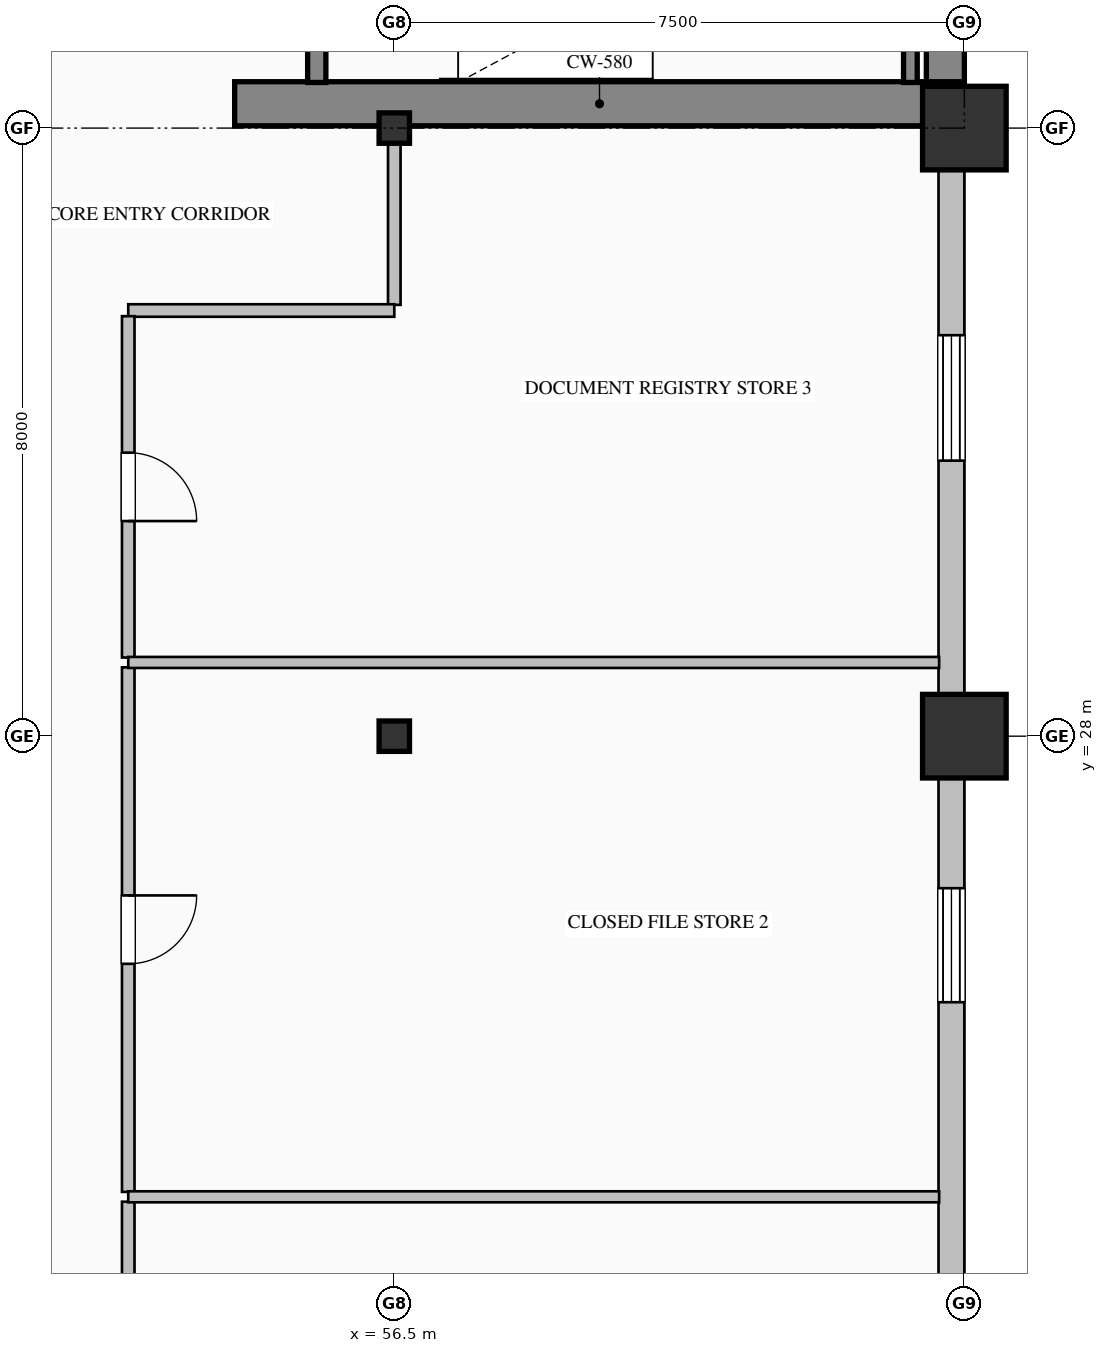
"""IFC4 building model, lengths in metres.
Left out: names, types, materials, properties, quantities, classifications, styles, units other than length and angle.
Written with IfcOpenShell. Run it as: python <this file> out.ifc"""

import sys

from ifc_helpers import new_model, si_unit, direction, frame, frame_2d, origin, origin_2d, place, context, subcontext, project, spatial, rectangle, hollow_rectangle, i_section, extrude, element, fill, save


model = new_model("IFC4")
c1 = context("Model", 3, precision=1e-05, world=origin(), true_north=direction((0.0, 1.0)))
c2 = subcontext(c1, "Body", "Model", "MODEL_VIEW")
j1 = project(units=[si_unit("LENGTHUNIT", "METRE"), si_unit("PLANEANGLEUNIT", "RADIAN")], contexts=[c1])
p1 = place(None, origin())
s1 = spatial("IfcSite", under=j1, at=p1, CompositionType="ELEMENT")
p2 = place(p1, origin())
s2 = spatial("IfcBuilding", under=s1, at=p2, CompositionType="ELEMENT")
p3 = place(p2, frame((0.0, 0.0, 191.0)))
s3 = spatial("IfcBuildingStorey", under=s2, at=p3, CompositionType="ELEMENT", Elevation=191.0)
p4 = place(p3, frame((63.75, 36.32, 0.0), z_axis=(0.0, 0.0, 1.0), x_axis=(0.0, 1.0, 0.0)))
e1 = element("IfcWall", 1, at=p4, inside=s3, PredefinedType="SHEAR", context=c2, shape_type="SweptSolid", body=[
    extrude(rectangle(XDim=15.18, YDim=0.5, at=frame_2d((7.59, 0.0))), origin(), (0.0, 0.0, 1.0), 3.65),
])
p5 = place(p3, frame((54.4, 36.32, 0.0), z_axis=(0.0, 0.0, 1.0), x_axis=(1.0, 0.0, 0.0)))
e2 = element("IfcWall", 2, at=p5, inside=s3, PredefinedType="SHEAR", context=c2, shape_type="SweptSolid", body=[
    extrude(rectangle(XDim=9.6, YDim=0.58, at=frame_2d((4.8, 0.0))), origin(), (0.0, 0.0, 1.0), 4.0),
])
for number, where, z_axis, x_axis in (
    (3, (56.5, 28.0, 0.0), (0.0, 0.0, 1.0), (1.0, 0.0, 0.0)),
    (4, (56.5, 36.0, 0.0), (0.0, 0.0, 1.0), (1.0, 0.0, 0.0)),
):
    element("IfcColumn", number, at=place(p3, frame(where, z_axis=z_axis, x_axis=x_axis)), inside=s3, PredefinedType="COLUMN", context=c2, shape_type="SweptSolid", body=[
        extrude(i_section(OverallWidth=0.4, OverallDepth=0.4, WebThickness=0.013, FlangeThickness=0.021, FilletRadius=0.022, at=origin_2d()), origin(), (0.0, 0.0, 1.0), 4.0),
    ])
for number, where, z_axis, x_axis in (
    (5, (64.0, 28.0, 0.0), (0.0, 0.0, 1.0), (1.0, 0.0, 0.0)),
    (6, (64.0, 36.0, 0.0), (0.0, 0.0, 1.0), (1.0, 0.0, 0.0)),
):
    element("IfcColumn", number, at=place(p3, frame(where, z_axis=z_axis, x_axis=x_axis)), inside=s3, PredefinedType="COLUMN", context=c2, shape_type="SweptSolid", body=[
        extrude(hollow_rectangle(XDim=1.1, YDim=1.1, WallThickness=0.04, at=origin_2d()), origin(), (0.0, 0.0, 1.0), 4.0),
    ])
p6 = place(p3, frame((63.83, 36.05, 0.0), z_axis=(0.0, 0.0, 1.0), x_axis=(0.0, -1.0, 0.0)))
e7 = element("IfcWall", 7, at=p6, inside=s3, PredefinedType="SOLIDWALL", context=c2, shape_type="SweptSolid", body=[
    extrude(rectangle(XDim=28.05, YDim=0.34, at=frame_2d((14.025, 0.0))), origin(), (0.0, 0.0, 1.0), 3.15),
])
p7 = place(p6, frame((2.775, 0.0, 0.85)))
e8 = element("IfcOpeningElement", 8, at=p7, cuts=e7, PredefinedType="OPENING", context=c2, shape_type="SweptSolid", body=[
    extrude(rectangle(XDim=1.65, YDim=1.95, at=frame_2d((0.825, 0.975))), frame((0.0, 0.18, 0.0), z_axis=(0.0, -1.0, 0.0), x_axis=(1.0, 0.0, 0.0)), (0.0, 0.0, 1.0), 0.36),
])
p8 = place(p6, frame((10.05, 0.0, 0.85)))
e9 = element("IfcOpeningElement", 9, at=p8, cuts=e7, PredefinedType="OPENING", context=c2, shape_type="SweptSolid", body=[
    extrude(rectangle(XDim=1.5, YDim=1.95, at=frame_2d((0.75, 0.975))), frame((0.0, 0.18, 0.0), z_axis=(0.0, -1.0, 0.0), x_axis=(1.0, 0.0, 0.0)), (0.0, 0.0, 1.0), 0.36),
])
p9 = place(p3, frame((55.48, 39.75, 0.0), z_axis=(0.0, 0.0, 1.0), x_axis=(0.0, -1.0, 0.0)))
e10 = element("IfcWall", 10, at=p9, inside=s3, PredefinedType="SOLIDWALL", context=c2, shape_type="SweptSolid", body=[
    extrude(rectangle(XDim=3.15, YDim=0.24, at=frame_2d((1.575, 0.0))), origin(), (0.0, 0.0, 1.0), 4.0),
])
p10 = place(p9, frame((1.0, 0.0, 0.0)))
e11 = element("IfcOpeningElement", 11, at=p10, cuts=e10, PredefinedType="OPENING", context=c2, shape_type="SweptSolid", body=[
    extrude(rectangle(XDim=1.15, YDim=2.2, at=frame_2d((0.575, 1.1))), frame((0.0, 0.13, 0.0), z_axis=(0.0, -1.0, 0.0), x_axis=(1.0, 0.0, 0.0)), (0.0, 0.0, 1.0), 0.26),
])
p11 = place(p3, frame((63.29, 36.6, 0.0), z_axis=(0.0, 0.0, 1.0), x_axis=(0.0, 1.0, 0.0)))
e12 = element("IfcWall", 12, at=p11, inside=s3, PredefinedType="SOLIDWALL", context=c2, shape_type="SweptSolid", body=[
    extrude(rectangle(XDim=3.15, YDim=0.18, at=frame_2d((1.575, 0.0))), origin(), (0.0, 0.0, 1.0), 4.0),
])
p12 = place(p3, frame((56.5, 36.0, 0.0), z_axis=(0.0, 0.0, 1.0), x_axis=(0.0, -1.0, 0.0)))
e13 = element("IfcWall", 13, at=p12, inside=s3, PredefinedType="PARTITIONING", context=c2, shape_type="SweptSolid", body=[
    extrude(rectangle(XDim=2.325, YDim=0.165, at=frame_2d((1.163, 0.0))), origin(), (0.0, 0.0, 1.0), 3.042),
])
p13 = place(p3, frame((56.5, 33.6, 0.0), z_axis=(0.0, 0.0, 1.0), x_axis=(-1.0, 0.0, 0.0)))
e14 = element("IfcWall", 14, at=p13, inside=s3, PredefinedType="PARTITIONING", context=c2, shape_type="SweptSolid", body=[
    extrude(rectangle(XDim=3.5, YDim=0.165, at=frame_2d((1.75, 0.0))), origin(), (0.0, 0.0, 1.0), 3.65),
])
p14 = place(p3, frame((53.0, 21.875, 0.0), z_axis=(0.0, 0.0, 1.0), x_axis=(0.0, -1.0, 0.0)))
e15 = element("IfcWall", 15, at=p14, inside=s3, PredefinedType="PARTITIONING", context=c2, shape_type="SweptSolid", body=[
    extrude(rectangle(XDim=7.101, YDim=0.165, at=frame_2d((3.551, 0.0))), origin(), (0.0, 0.0, 1.0), 3.65),
])
p15 = place(p3, frame((53.0, 28.906, 0.0), z_axis=(0.0, 0.0, 1.0), x_axis=(0.0, -1.0, 0.0)))
e16 = element("IfcWall", 16, at=p15, inside=s3, PredefinedType="PARTITIONING", context=c2, shape_type="SweptSolid", body=[
    extrude(rectangle(XDim=6.901, YDim=0.165, at=frame_2d((3.451, 0.0))), origin(), (0.0, 0.0, 1.0), 3.65),
])
p16 = place(p15, frame((3.0, 0.0, 0.0)))
e17 = element("IfcOpeningElement", 17, at=p16, cuts=e16, PredefinedType="OPENING", context=c2, shape_type="SweptSolid", body=[
    extrude(rectangle(XDim=0.9, YDim=2.15, at=frame_2d((0.45, 1.075))), frame((0.0, 0.093, 0.0), z_axis=(0.0, -1.0, 0.0), x_axis=(1.0, 0.0, 0.0)), (0.0, 0.0, 1.0), 0.185),
])
p17 = place(p3, frame((53.0, 33.525, 0.0), z_axis=(0.0, 0.0, 1.0), x_axis=(0.0, -1.0, 0.0)))
e18 = element("IfcWall", 18, at=p17, inside=s3, PredefinedType="PARTITIONING", context=c2, shape_type="SweptSolid", body=[
    extrude(rectangle(XDim=4.491, YDim=0.165, at=frame_2d((2.246, 0.0))), origin(), (0.0, 0.0, 1.0), 3.65),
])
p18 = place(p17, frame((1.795, 0.0, 0.0)))
e19 = element("IfcOpeningElement", 19, at=p18, cuts=e18, PredefinedType="OPENING", context=c2, shape_type="SweptSolid", body=[
    extrude(rectangle(XDim=0.9, YDim=2.15, at=frame_2d((0.45, 1.075))), frame((0.0, 0.093, 0.0), z_axis=(0.0, -1.0, 0.0), x_axis=(1.0, 0.0, 0.0)), (0.0, 0.0, 1.0), 0.185),
])
for number, where, z_axis, x_axis in (
    (20, (53.0, 21.94, 0.0), (0.0, 0.0, 1.0), (1.0, 0.0, 0.0)),
    (21, (53.0, 28.97, 0.0), (0.0, 0.0, 1.0), (1.0, 0.0, 0.0)),
):
    element("IfcWall", number, at=place(p3, frame(where, z_axis=z_axis, x_axis=x_axis)), inside=s3, PredefinedType="PARTITIONING", context=c2, shape_type="SweptSolid", body=[
        extrude(rectangle(XDim=10.668, YDim=0.145, at=frame_2d((5.334, 0.0))), origin(), (0.0, 0.0, 1.0), 3.65),
    ])
p19 = place(p7, origin())
e22 = element("IfcWindow", 22, at=p19, inside=s3, PartitioningType="DOUBLE_PANEL_VERTICAL", PredefinedType="WINDOW", context=c2, shape_type="SweptSolid", body=[
    extrude(rectangle(XDim=1.65, YDim=1.95, at=frame_2d((0.825, 0.975))), frame((0.0, 0.15, 0.0), z_axis=(0.0, -1.0, 0.0), x_axis=(1.0, 0.0, 0.0)), (0.0, 0.0, 1.0), 0.06),
])
fill(e8, e22)
p20 = place(p8, origin())
e23 = element("IfcWindow", 23, at=p20, inside=s3, PartitioningType="DOUBLE_PANEL_VERTICAL", PredefinedType="WINDOW", context=c2, shape_type="SweptSolid", body=[
    extrude(rectangle(XDim=1.5, YDim=1.95, at=frame_2d((0.75, 0.975))), frame((0.0, 0.15, 0.0), z_axis=(0.0, -1.0, 0.0), x_axis=(1.0, 0.0, 0.0)), (0.0, 0.0, 1.0), 0.06),
])
fill(e9, e23)
p21 = place(p16, origin())
e24 = element("IfcDoor", 24, at=p21, inside=s3, OperationType="SINGLE_SWING_LEFT", PredefinedType="DOOR", context=c2, shape_type="SweptSolid", body=[
    extrude(rectangle(XDim=0.9, YDim=2.15, at=frame_2d((0.45, 1.075))), frame((0.0, 0.025, 0.0), z_axis=(0.0, -1.0, 0.0), x_axis=(1.0, 0.0, 0.0)), (0.0, 0.0, 1.0), 0.05),
])
fill(e17, e24)
p22 = place(p18, origin())
e25 = element("IfcDoor", 25, at=p22, inside=s3, OperationType="SINGLE_SWING_RIGHT", PredefinedType="DOOR", context=c2, shape_type="SweptSolid", body=[
    extrude(rectangle(XDim=0.9, YDim=2.15, at=frame_2d((0.45, 1.075))), frame((0.0, 0.025, 0.0), z_axis=(0.0, -1.0, 0.0), x_axis=(1.0, 0.0, 0.0)), (0.0, 0.0, 1.0), 0.05),
])
fill(e19, e25)
save(model, sys.argv[1])
